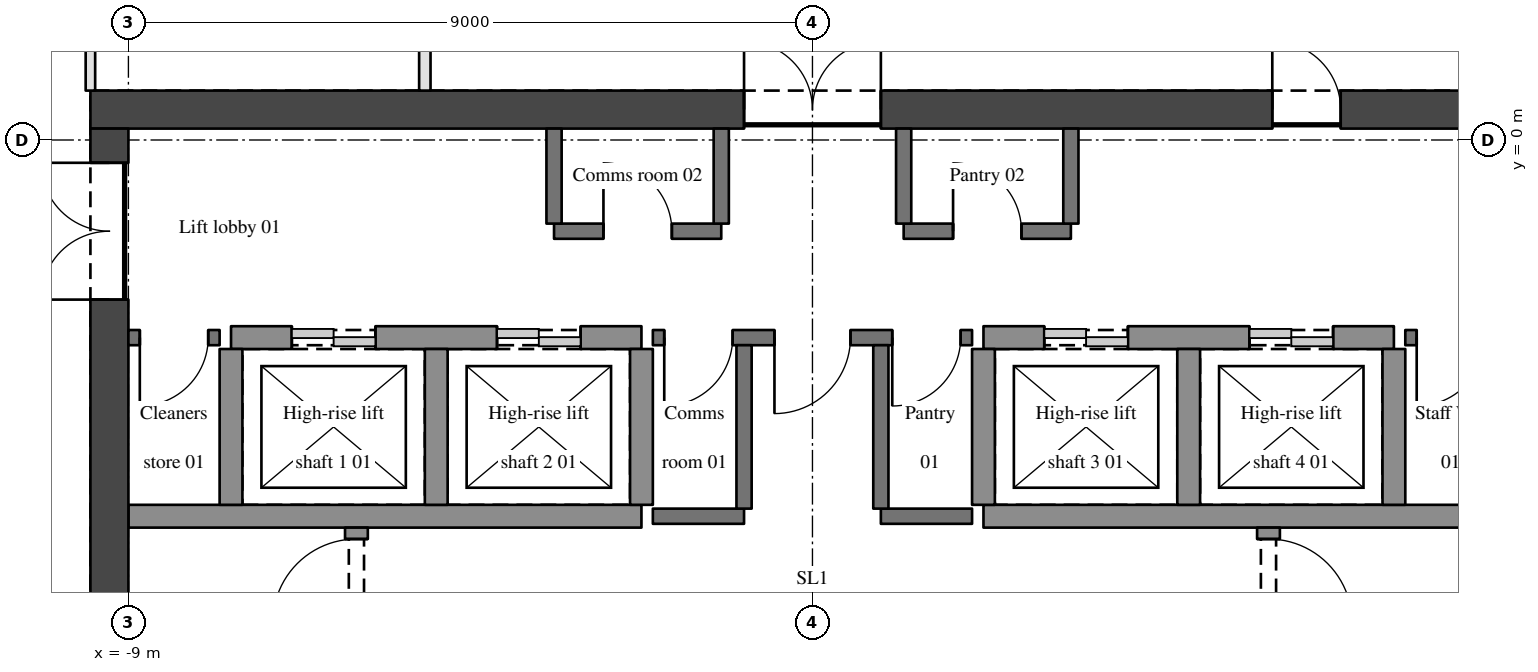
"""IFC4 building model, lengths in metres.
Left out: names, types, materials, properties, quantities, classifications, styles, units other than length and angle.
Written with IfcOpenShell. Run it as: python <this file> out.ifc"""

import sys

from ifc_helpers import new_model, si_unit, direction, frame, frame_2d, origin, place, context, subcontext, project, spatial, rectangle, extrude, element, fill, save


model = new_model("IFC4")
c1 = context("Model", 3, precision=1e-05, world=origin(), true_north=direction((0.0, 1.0)))
c2 = subcontext(c1, "Body", "Model", "MODEL_VIEW")
j1 = project(units=[si_unit("LENGTHUNIT", "METRE"), si_unit("PLANEANGLEUNIT", "RADIAN")], contexts=[c1])
p1 = place(None, origin())
s1 = spatial("IfcSite", under=j1, at=p1, CompositionType="ELEMENT")
p2 = place(p1, origin())
s2 = spatial("IfcBuilding", under=s1, at=p2, CompositionType="ELEMENT")
p3 = place(p2, frame((0.0, 0.0, 294.15)))
s3 = spatial("IfcBuildingStorey", under=s2, at=p3, CompositionType="ELEMENT", Elevation=294.15)
p4 = place(p3, frame((-9.5, 0.4, 0.0), z_axis=(0.0, 0.0, 1.0), x_axis=(1.0, 0.0, 0.0)))
e1 = element("IfcWall", 1, at=p4, inside=s3, PredefinedType="SHEAR", context=c2, shape_type="SweptSolid", body=[
    extrude(rectangle(XDim=19.0, YDim=0.5, at=frame_2d((9.5, 0.0))), origin(), (0.0, 0.0, 1.0), 3.15),
])
p5 = place(p4, frame((8.6, 0.0, 0.0)))
e2 = element("IfcOpeningElement", 2, at=p5, cuts=e1, PredefinedType="OPENING", context=c2, shape_type="SweptSolid", body=[
    extrude(rectangle(XDim=1.8, YDim=2.1, at=frame_2d((0.9, 1.05))), frame((0.0, 0.26, 0.0), z_axis=(0.0, -1.0, 0.0), x_axis=(1.0, 0.0, 0.0)), (0.0, 0.0, 1.0), 0.52),
])
p6 = place(p4, frame((15.55, 0.0, 0.0)))
e3 = element("IfcOpeningElement", 3, at=p6, cuts=e1, PredefinedType="OPENING", context=c2, shape_type="SweptSolid", body=[
    extrude(rectangle(XDim=0.9, YDim=2.1, at=frame_2d((0.45, 1.05))), frame((0.0, 0.26, 0.0), z_axis=(0.0, -1.0, 0.0), x_axis=(1.0, 0.0, 0.0)), (0.0, 0.0, 1.0), 0.52),
])
p7 = place(p3, frame((-9.25, -11.5, 0.0), z_axis=(0.0, 0.0, 1.0), x_axis=(0.0, 1.0, 0.0)))
e4 = element("IfcWall", 4, at=p7, inside=s3, PredefinedType="SHEAR", context=c2, shape_type="SweptSolid", body=[
    extrude(rectangle(XDim=11.65, YDim=0.5, at=frame_2d((5.825, 0.0))), origin(), (0.0, 0.0, 1.0), 3.15),
])
p8 = place(p7, frame((9.4, 0.0, 0.0)))
e5 = element("IfcOpeningElement", 5, at=p8, cuts=e4, PredefinedType="OPENING", context=c2, shape_type="SweptSolid", body=[
    extrude(rectangle(XDim=1.8, YDim=2.1, at=frame_2d((0.9, 1.05))), frame((0.0, 0.26, 0.0), z_axis=(0.0, -1.0, 0.0), x_axis=(1.0, 0.0, 0.0)), (0.0, 0.0, 1.0), 0.52),
])
p9 = place(p3, frame((-9.0, -4.95, 0.0), z_axis=(0.0, 0.0, 1.0), x_axis=(1.0, 0.0, 0.0)))
e6 = element("IfcWall", 6, at=p9, inside=s3, PredefinedType="SHEAR", context=c2, shape_type="SweptSolid", body=[
    extrude(rectangle(XDim=6.75, YDim=0.3, at=frame_2d((3.375, 0.0))), origin(), (0.0, 0.0, 1.0), 3.15),
])
for number, where, z_axis, x_axis in (
    (7, (-2.1, -4.95, 0.0), (0.0, 0.0, 1.0), (1.0, 0.0, 0.0)),
    (8, (0.9, -4.95, 0.0), (0.0, 0.0, 1.0), (1.0, 0.0, 0.0)),
):
    element("IfcWall", number, at=place(p3, frame(where, z_axis=z_axis, x_axis=x_axis)), inside=s3, PredefinedType="SOLIDWALL", context=c2, shape_type="SweptSolid", body=[
        extrude(rectangle(XDim=1.2, YDim=0.2, at=frame_2d((0.6, 0.0))), origin(), (0.0, 0.0, 1.0), 2.85),
    ])
p10 = place(p3, frame((2.25, -4.95, 0.0), z_axis=(0.0, 0.0, 1.0), x_axis=(1.0, 0.0, 0.0)))
e9 = element("IfcWall", 9, at=p10, inside=s3, PredefinedType="SHEAR", context=c2, shape_type="SweptSolid", body=[
    extrude(rectangle(XDim=6.75, YDim=0.3, at=frame_2d((3.375, 0.0))), origin(), (0.0, 0.0, 1.0), 3.15),
])
p11 = place(p3, frame((-7.8, -2.6, 0.0), z_axis=(0.0, 0.0, 1.0), x_axis=(-1.0, 0.0, 0.0)))
e10 = element("IfcWall", 10, at=p11, inside=s3, PredefinedType="SOLIDWALL", context=c2, shape_type="SweptSolid", body=[
    extrude(rectangle(XDim=1.2, YDim=0.2, at=frame_2d((0.6, 0.0))), origin(), (0.0, 0.0, 1.0), 2.85),
])
p12 = place(p11, frame((0.15, 0.0, 0.0)))
e11 = element("IfcOpeningElement", 11, at=p12, cuts=e10, PredefinedType="OPENING", context=c2, shape_type="SweptSolid", body=[
    extrude(rectangle(XDim=0.9, YDim=2.1, at=frame_2d((0.45, 1.05))), frame((0.0, 0.11, 0.0), z_axis=(0.0, -1.0, 0.0), x_axis=(1.0, 0.0, 0.0)), (0.0, 0.0, 1.0), 0.22),
])
p13 = place(p3, frame((-7.65, -2.6, 0.0), z_axis=(0.0, 0.0, 1.0), x_axis=(1.0, 0.0, 0.0)))
e12 = element("IfcWall", 12, at=p13, inside=s3, PredefinedType="SHEAR", context=c2, shape_type="SweptSolid", body=[
    extrude(rectangle(XDim=5.4, YDim=0.3, at=frame_2d((2.7, 0.0))), origin(), (0.0, 0.0, 1.0), 3.15),
])
p14 = place(p13, frame((0.8, 0.0, 0.0)))
e13 = element("IfcOpeningElement", 13, at=p14, cuts=e12, PredefinedType="OPENING", context=c2, shape_type="SweptSolid", body=[
    extrude(rectangle(XDim=1.1, YDim=2.1, at=frame_2d((0.55, 1.05))), frame((0.0, 0.16, 0.0), z_axis=(0.0, -1.0, 0.0), x_axis=(1.0, 0.0, 0.0)), (0.0, 0.0, 1.0), 0.32),
])
p15 = place(p13, frame((3.5, 0.0, 0.0)))
e14 = element("IfcOpeningElement", 14, at=p15, cuts=e12, PredefinedType="OPENING", context=c2, shape_type="SweptSolid", body=[
    extrude(rectangle(XDim=1.1, YDim=2.1, at=frame_2d((0.55, 1.05))), frame((0.0, 0.16, 0.0), z_axis=(0.0, -1.0, 0.0), x_axis=(1.0, 0.0, 0.0)), (0.0, 0.0, 1.0), 0.32),
])
p16 = place(p3, frame((2.1, -2.6, 0.0), z_axis=(0.0, 0.0, 1.0), x_axis=(-1.0, 0.0, 0.0)))
e15 = element("IfcWall", 15, at=p16, inside=s3, PredefinedType="SOLIDWALL", context=c2, shape_type="SweptSolid", body=[
    extrude(rectangle(XDim=4.2, YDim=0.2, at=frame_2d((2.1, 0.0))), origin(), (0.0, 0.0, 1.0), 2.85),
])
p17 = place(p16, frame((1.6, 0.0, 0.0)))
e16 = element("IfcOpeningElement", 16, at=p17, cuts=e15, PredefinedType="OPENING", context=c2, shape_type="SweptSolid", body=[
    extrude(rectangle(XDim=1.0, YDim=2.1, at=frame_2d((0.5, 1.05))), frame((0.0, 0.11, 0.0), z_axis=(0.0, -1.0, 0.0), x_axis=(1.0, 0.0, 0.0)), (0.0, 0.0, 1.0), 0.22),
])
p18 = place(p16, frame((3.15, 0.0, 0.0)))
e17 = element("IfcOpeningElement", 17, at=p18, cuts=e15, PredefinedType="OPENING", context=c2, shape_type="SweptSolid", body=[
    extrude(rectangle(XDim=0.9, YDim=2.1, at=frame_2d((0.45, 1.05))), frame((0.0, 0.11, 0.0), z_axis=(0.0, -1.0, 0.0), x_axis=(1.0, 0.0, 0.0)), (0.0, 0.0, 1.0), 0.22),
])
p19 = place(p16, frame((0.15, 0.0, 0.0)))
e18 = element("IfcOpeningElement", 18, at=p19, cuts=e15, PredefinedType="OPENING", context=c2, shape_type="SweptSolid", body=[
    extrude(rectangle(XDim=0.9, YDim=2.1, at=frame_2d((0.45, 1.05))), frame((0.0, 0.11, 0.0), z_axis=(0.0, -1.0, 0.0), x_axis=(1.0, 0.0, 0.0)), (0.0, 0.0, 1.0), 0.22),
])
p20 = place(p3, frame((2.25, -2.6, 0.0), z_axis=(0.0, 0.0, 1.0), x_axis=(1.0, 0.0, 0.0)))
e19 = element("IfcWall", 19, at=p20, inside=s3, PredefinedType="SHEAR", context=c2, shape_type="SweptSolid", body=[
    extrude(rectangle(XDim=5.4, YDim=0.3, at=frame_2d((2.7, 0.0))), origin(), (0.0, 0.0, 1.0), 3.15),
])
p21 = place(p20, frame((0.8, 0.0, 0.0)))
e20 = element("IfcOpeningElement", 20, at=p21, cuts=e19, PredefinedType="OPENING", context=c2, shape_type="SweptSolid", body=[
    extrude(rectangle(XDim=1.1, YDim=2.1, at=frame_2d((0.55, 1.05))), frame((0.0, 0.16, 0.0), z_axis=(0.0, -1.0, 0.0), x_axis=(1.0, 0.0, 0.0)), (0.0, 0.0, 1.0), 0.32),
])
p22 = place(p20, frame((3.5, 0.0, 0.0)))
e21 = element("IfcOpeningElement", 21, at=p22, cuts=e19, PredefinedType="OPENING", context=c2, shape_type="SweptSolid", body=[
    extrude(rectangle(XDim=1.1, YDim=2.1, at=frame_2d((0.55, 1.05))), frame((0.0, 0.16, 0.0), z_axis=(0.0, -1.0, 0.0), x_axis=(1.0, 0.0, 0.0)), (0.0, 0.0, 1.0), 0.32),
])
p23 = place(p3, frame((9.0, -2.6, 0.0), z_axis=(0.0, 0.0, 1.0), x_axis=(-1.0, 0.0, 0.0)))
e22 = element("IfcWall", 22, at=p23, inside=s3, PredefinedType="SOLIDWALL", context=c2, shape_type="SweptSolid", body=[
    extrude(rectangle(XDim=1.2, YDim=0.2, at=frame_2d((0.6, 0.0))), origin(), (0.0, 0.0, 1.0), 2.85),
])
p24 = place(p23, frame((0.15, 0.0, 0.0)))
e23 = element("IfcOpeningElement", 23, at=p24, cuts=e22, PredefinedType="OPENING", context=c2, shape_type="SweptSolid", body=[
    extrude(rectangle(XDim=0.9, YDim=2.1, at=frame_2d((0.45, 1.05))), frame((0.0, 0.11, 0.0), z_axis=(0.0, -1.0, 0.0), x_axis=(1.0, 0.0, 0.0)), (0.0, 0.0, 1.0), 0.22),
])
p25 = place(p3, frame((-3.4, -1.2, 0.0), z_axis=(0.0, 0.0, 1.0), x_axis=(1.0, 0.0, 0.0)))
e24 = element("IfcWall", 24, at=p25, inside=s3, PredefinedType="SOLIDWALL", context=c2, shape_type="SweptSolid", body=[
    extrude(rectangle(XDim=2.2, YDim=0.2, at=frame_2d((1.1, 0.0))), origin(), (0.0, 0.0, 1.0), 2.85),
])
p26 = place(p25, frame((0.65, 0.0, 0.0)))
e25 = element("IfcOpeningElement", 25, at=p26, cuts=e24, PredefinedType="OPENING", context=c2, shape_type="SweptSolid", body=[
    extrude(rectangle(XDim=0.9, YDim=2.1, at=frame_2d((0.45, 1.05))), frame((0.0, 0.11, 0.0), z_axis=(0.0, -1.0, 0.0), x_axis=(1.0, 0.0, 0.0)), (0.0, 0.0, 1.0), 0.22),
])
p27 = place(p3, frame((1.2, -1.2, 0.0), z_axis=(0.0, 0.0, 1.0), x_axis=(1.0, 0.0, 0.0)))
e26 = element("IfcWall", 26, at=p27, inside=s3, PredefinedType="SOLIDWALL", context=c2, shape_type="SweptSolid", body=[
    extrude(rectangle(XDim=2.2, YDim=0.2, at=frame_2d((1.1, 0.0))), origin(), (0.0, 0.0, 1.0), 2.85),
])
p28 = place(p27, frame((0.65, 0.0, 0.0)))
e27 = element("IfcOpeningElement", 27, at=p28, cuts=e26, PredefinedType="OPENING", context=c2, shape_type="SweptSolid", body=[
    extrude(rectangle(XDim=0.9, YDim=2.1, at=frame_2d((0.45, 1.05))), frame((0.0, 0.11, 0.0), z_axis=(0.0, -1.0, 0.0), x_axis=(1.0, 0.0, 0.0)), (0.0, 0.0, 1.0), 0.22),
])
p29 = place(p3, frame((-9.5, 0.65, 0.0), z_axis=(0.0, 0.0, 1.0), x_axis=(0.0, 1.0, 0.0)))
e28 = element("IfcWall", 28, at=p29, inside=s3, PredefinedType="PARTITIONING", context=c2, shape_type="SweptSolid", body=[
    extrude(rectangle(XDim=2.525, YDim=0.125, at=frame_2d((1.263, 0.0))), origin(), (0.0, 0.0, 1.0), 2.21),
])
p30 = place(p3, frame((-7.65, -4.8, 0.0), z_axis=(0.0, 0.0, 1.0), x_axis=(0.0, 1.0, 0.0)))
e29 = element("IfcWall", 29, at=p30, inside=s3, PredefinedType="SHEAR", context=c2, shape_type="SweptSolid", body=[
    extrude(rectangle(XDim=2.05, YDim=0.3, at=frame_2d((1.025, 0.0))), origin(), (0.0, 0.0, 1.0), 3.15),
])
p31 = place(p3, frame((-6.0, -11.5, 0.0), z_axis=(0.0, 0.0, 1.0), x_axis=(0.0, 1.0, 0.0)))
e30 = element("IfcWall", 30, at=p31, inside=s3, PredefinedType="SHEAR", context=c2, shape_type="SweptSolid", body=[
    extrude(rectangle(XDim=6.4, YDim=0.3, at=frame_2d((3.2, 0.0))), origin(), (0.0, 0.0, 1.0), 3.15),
])
p32 = place(p31, frame((5.15, 0.0, 0.0)))
e31 = element("IfcOpeningElement", 31, at=p32, cuts=e30, PredefinedType="OPENING", context=c2, shape_type="SweptSolid", body=[
    extrude(rectangle(XDim=1.1, YDim=2.1, at=frame_2d((0.55, 1.05))), frame((0.0, 0.16, 0.0), z_axis=(0.0, -1.0, 0.0), x_axis=(1.0, 0.0, 0.0)), (0.0, 0.0, 1.0), 0.32),
])
p33 = place(p3, frame((-5.1, 0.65, 0.0), z_axis=(0.0, 0.0, 1.0), x_axis=(0.0, 1.0, 0.0)))
e32 = element("IfcWall", 32, at=p33, inside=s3, PredefinedType="PARTITIONING", context=c2, shape_type="SweptSolid", body=[
    extrude(rectangle(XDim=2.525, YDim=0.15, at=frame_2d((1.263, 0.0))), origin(), (0.0, 0.0, 1.0), 2.21),
])
p34 = place(p33, frame((0.85, 0.0, 0.0)))
e33 = element("IfcOpeningElement", 33, at=p34, cuts=e32, PredefinedType="OPENING", context=c2, shape_type="SweptSolid", body=[
    extrude(rectangle(XDim=0.9, YDim=2.1, at=frame_2d((0.45, 1.05))), frame((0.0, 0.085, 0.0), z_axis=(0.0, -1.0, 0.0), x_axis=(1.0, 0.0, 0.0)), (0.0, 0.0, 1.0), 0.17),
])
p35 = place(p3, frame((-4.95, -4.8, 0.0), z_axis=(0.0, 0.0, 1.0), x_axis=(0.0, 1.0, 0.0)))
e34 = element("IfcWall", 34, at=p35, inside=s3, PredefinedType="SHEAR", context=c2, shape_type="SweptSolid", body=[
    extrude(rectangle(XDim=2.05, YDim=0.3, at=frame_2d((1.025, 0.0))), origin(), (0.0, 0.0, 1.0), 3.15),
])
p36 = place(p3, frame((-3.4, -1.1, 0.0), z_axis=(0.0, 0.0, 1.0), x_axis=(0.0, 1.0, 0.0)))
e35 = element("IfcWall", 35, at=p36, inside=s3, PredefinedType="SOLIDWALL", context=c2, shape_type="SweptSolid", body=[
    extrude(rectangle(XDim=1.25, YDim=0.2, at=frame_2d((0.625, 0.0))), origin(), (0.0, 0.0, 1.0), 2.85),
])
p37 = place(p3, frame((-2.25, -4.8, 0.0), z_axis=(0.0, 0.0, 1.0), x_axis=(0.0, 1.0, 0.0)))
e36 = element("IfcWall", 36, at=p37, inside=s3, PredefinedType="SHEAR", context=c2, shape_type="SweptSolid", body=[
    extrude(rectangle(XDim=2.05, YDim=0.3, at=frame_2d((1.025, 0.0))), origin(), (0.0, 0.0, 1.0), 3.15),
])
p38 = place(p3, frame((-1.2, -1.1, 0.0), z_axis=(0.0, 0.0, 1.0), x_axis=(0.0, 1.0, 0.0)))
e37 = element("IfcWall", 37, at=p38, inside=s3, PredefinedType="SOLIDWALL", context=c2, shape_type="SweptSolid", body=[
    extrude(rectangle(XDim=1.25, YDim=0.2, at=frame_2d((0.625, 0.0))), origin(), (0.0, 0.0, 1.0), 2.85),
])
for number, where, z_axis, x_axis in (
    (38, (-0.9, -4.85, 0.0), (0.0, 0.0, 1.0), (0.0, 1.0, 0.0)),
    (39, (0.9, -4.85, 0.0), (0.0, 0.0, 1.0), (0.0, 1.0, 0.0)),
):
    element("IfcWall", number, at=place(p3, frame(where, z_axis=z_axis, x_axis=x_axis)), inside=s3, PredefinedType="SOLIDWALL", context=c2, shape_type="SweptSolid", body=[
        extrude(rectangle(XDim=2.15, YDim=0.2, at=frame_2d((1.075, 0.0))), origin(), (0.0, 0.0, 1.0), 2.85),
    ])
p39 = place(p3, frame((1.2, -1.1, 0.0), z_axis=(0.0, 0.0, 1.0), x_axis=(0.0, 1.0, 0.0)))
e40 = element("IfcWall", 40, at=p39, inside=s3, PredefinedType="SOLIDWALL", context=c2, shape_type="SweptSolid", body=[
    extrude(rectangle(XDim=1.25, YDim=0.2, at=frame_2d((0.625, 0.0))), origin(), (0.0, 0.0, 1.0), 2.85),
])
p40 = place(p3, frame((2.25, -4.8, 0.0), z_axis=(0.0, 0.0, 1.0), x_axis=(0.0, 1.0, 0.0)))
e41 = element("IfcWall", 41, at=p40, inside=s3, PredefinedType="SHEAR", context=c2, shape_type="SweptSolid", body=[
    extrude(rectangle(XDim=2.05, YDim=0.3, at=frame_2d((1.025, 0.0))), origin(), (0.0, 0.0, 1.0), 3.15),
])
p41 = place(p3, frame((3.4, -1.1, 0.0), z_axis=(0.0, 0.0, 1.0), x_axis=(0.0, 1.0, 0.0)))
e42 = element("IfcWall", 42, at=p41, inside=s3, PredefinedType="SOLIDWALL", context=c2, shape_type="SweptSolid", body=[
    extrude(rectangle(XDim=1.25, YDim=0.2, at=frame_2d((0.625, 0.0))), origin(), (0.0, 0.0, 1.0), 2.85),
])
p42 = place(p3, frame((4.95, -4.8, 0.0), z_axis=(0.0, 0.0, 1.0), x_axis=(0.0, 1.0, 0.0)))
e43 = element("IfcWall", 43, at=p42, inside=s3, PredefinedType="SHEAR", context=c2, shape_type="SweptSolid", body=[
    extrude(rectangle(XDim=2.05, YDim=0.3, at=frame_2d((1.025, 0.0))), origin(), (0.0, 0.0, 1.0), 3.15),
])
p43 = place(p3, frame((6.0, -5.1, 0.0), z_axis=(0.0, 0.0, 1.0), x_axis=(0.0, -1.0, 0.0)))
e44 = element("IfcWall", 44, at=p43, inside=s3, PredefinedType="SHEAR", context=c2, shape_type="SweptSolid", body=[
    extrude(rectangle(XDim=6.4, YDim=0.3, at=frame_2d((3.2, 0.0))), origin(), (0.0, 0.0, 1.0), 3.15),
])
p44 = place(p43, frame((0.15, 0.0, 0.0)))
e45 = element("IfcOpeningElement", 45, at=p44, cuts=e44, PredefinedType="OPENING", context=c2, shape_type="SweptSolid", body=[
    extrude(rectangle(XDim=1.1, YDim=2.1, at=frame_2d((0.55, 1.05))), frame((0.0, 0.16, 0.0), z_axis=(0.0, -1.0, 0.0), x_axis=(1.0, 0.0, 0.0)), (0.0, 0.0, 1.0), 0.32),
])
p45 = place(p3, frame((7.65, -4.8, 0.0), z_axis=(0.0, 0.0, 1.0), x_axis=(0.0, 1.0, 0.0)))
e46 = element("IfcWall", 46, at=p45, inside=s3, PredefinedType="SHEAR", context=c2, shape_type="SweptSolid", body=[
    extrude(rectangle(XDim=2.05, YDim=0.3, at=frame_2d((1.025, 0.0))), origin(), (0.0, 0.0, 1.0), 3.15),
])
p46 = place(p5, origin())
e47 = element("IfcDoor", 47, at=p46, inside=s3, OperationType="DOUBLE_DOOR_SINGLE_SWING", PredefinedType="DOOR", context=c2, shape_type="SweptSolid", body=[
    extrude(rectangle(XDim=1.8, YDim=2.1, at=frame_2d((0.9, 1.05))), frame((0.0, 0.025, 0.0), z_axis=(0.0, -1.0, 0.0), x_axis=(1.0, 0.0, 0.0)), (0.0, 0.0, 1.0), 0.05),
])
fill(e2, e47)
p47 = place(p8, origin())
e48 = element("IfcDoor", 48, at=p47, inside=s3, OperationType="DOUBLE_DOOR_SINGLE_SWING", PredefinedType="DOOR", context=c2, shape_type="SweptSolid", body=[
    extrude(rectangle(XDim=1.8, YDim=2.1, at=frame_2d((0.9, 1.05))), frame((0.0, 0.025, 0.0), z_axis=(0.0, -1.0, 0.0), x_axis=(1.0, 0.0, 0.0)), (0.0, 0.0, 1.0), 0.05),
])
fill(e5, e48)
p48 = place(p17, origin())
e49 = element("IfcDoor", 49, at=p48, inside=s3, OperationType="SINGLE_SWING_RIGHT", PredefinedType="DOOR", context=c2, shape_type="SweptSolid", body=[
    extrude(rectangle(XDim=1.0, YDim=2.1, at=frame_2d((0.5, 1.05))), frame((0.0, 0.025, 0.0), z_axis=(0.0, -1.0, 0.0), x_axis=(1.0, 0.0, 0.0)), (0.0, 0.0, 1.0), 0.05),
])
fill(e16, e49)
p49 = place(p32, origin())
e50 = element("IfcDoor", 50, at=p49, inside=s3, OperationType="SINGLE_SWING_LEFT", PredefinedType="DOOR", context=c2, shape_type="SweptSolid", body=[
    extrude(rectangle(XDim=1.1, YDim=2.1, at=frame_2d((0.55, 1.05))), frame((0.0, 0.025, 0.0), z_axis=(0.0, -1.0, 0.0), x_axis=(1.0, 0.0, 0.0)), (0.0, 0.0, 1.0), 0.05),
])
fill(e31, e50)
p50 = place(p44, origin())
e51 = element("IfcDoor", 51, at=p50, inside=s3, OperationType="SINGLE_SWING_RIGHT", PredefinedType="DOOR", context=c2, shape_type="SweptSolid", body=[
    extrude(rectangle(XDim=1.1, YDim=2.1, at=frame_2d((0.55, 1.05))), frame((0.0, 0.025, 0.0), z_axis=(0.0, -1.0, 0.0), x_axis=(1.0, 0.0, 0.0)), (0.0, 0.0, 1.0), 0.05),
])
fill(e45, e51)
p51 = place(p18, origin())
e52 = element("IfcDoor", 52, at=p51, inside=s3, OperationType="SINGLE_SWING_RIGHT", PredefinedType="DOOR", context=c2, shape_type="SweptSolid", body=[
    extrude(rectangle(XDim=0.9, YDim=2.1, at=frame_2d((0.45, 1.05))), frame((0.0, 0.025, 0.0), z_axis=(0.0, -1.0, 0.0), x_axis=(1.0, 0.0, 0.0)), (0.0, 0.0, 1.0), 0.05),
])
fill(e17, e52)
p52 = place(p19, origin())
e53 = element("IfcDoor", 53, at=p52, inside=s3, OperationType="SINGLE_SWING_RIGHT", PredefinedType="DOOR", context=c2, shape_type="SweptSolid", body=[
    extrude(rectangle(XDim=0.9, YDim=2.1, at=frame_2d((0.45, 1.05))), frame((0.0, 0.025, 0.0), z_axis=(0.0, -1.0, 0.0), x_axis=(1.0, 0.0, 0.0)), (0.0, 0.0, 1.0), 0.05),
])
fill(e18, e53)
p53 = place(p24, origin())
e54 = element("IfcDoor", 54, at=p53, inside=s3, OperationType="SINGLE_SWING_RIGHT", PredefinedType="DOOR", context=c2, shape_type="SweptSolid", body=[
    extrude(rectangle(XDim=0.9, YDim=2.1, at=frame_2d((0.45, 1.05))), frame((0.0, 0.025, 0.0), z_axis=(0.0, -1.0, 0.0), x_axis=(1.0, 0.0, 0.0)), (0.0, 0.0, 1.0), 0.05),
])
fill(e23, e54)
p54 = place(p12, origin())
e55 = element("IfcDoor", 55, at=p54, inside=s3, OperationType="SINGLE_SWING_RIGHT", PredefinedType="DOOR", context=c2, shape_type="SweptSolid", body=[
    extrude(rectangle(XDim=0.9, YDim=2.1, at=frame_2d((0.45, 1.05))), frame((0.0, 0.025, 0.0), z_axis=(0.0, -1.0, 0.0), x_axis=(1.0, 0.0, 0.0)), (0.0, 0.0, 1.0), 0.05),
])
fill(e11, e55)
p55 = place(p6, origin())
e56 = element("IfcDoor", 56, at=p55, inside=s3, OperationType="SINGLE_SWING_LEFT", PredefinedType="DOOR", context=c2, shape_type="SweptSolid", body=[
    extrude(rectangle(XDim=0.9, YDim=2.1, at=frame_2d((0.45, 1.05))), frame((0.0, 0.025, 0.0), z_axis=(0.0, -1.0, 0.0), x_axis=(1.0, 0.0, 0.0)), (0.0, 0.0, 1.0), 0.05),
])
fill(e3, e56)
p56 = place(p26, origin())
e57 = element("IfcDoor", 57, at=p56, inside=s3, OperationType="SINGLE_SWING_LEFT", PredefinedType="DOOR", context=c2, shape_type="SweptSolid", body=[
    extrude(rectangle(XDim=0.9, YDim=2.1, at=frame_2d((0.45, 1.05))), frame((0.0, 0.025, 0.0), z_axis=(0.0, -1.0, 0.0), x_axis=(1.0, 0.0, 0.0)), (0.0, 0.0, 1.0), 0.05),
])
fill(e25, e57)
p57 = place(p28, origin())
e58 = element("IfcDoor", 58, at=p57, inside=s3, OperationType="SINGLE_SWING_LEFT", PredefinedType="DOOR", context=c2, shape_type="SweptSolid", body=[
    extrude(rectangle(XDim=0.9, YDim=2.1, at=frame_2d((0.45, 1.05))), frame((0.0, 0.025, 0.0), z_axis=(0.0, -1.0, 0.0), x_axis=(1.0, 0.0, 0.0)), (0.0, 0.0, 1.0), 0.05),
])
fill(e27, e58)
p58 = place(p14, origin())
e59 = element("IfcDoor", 59, at=p58, inside=s3, OperationType="DOUBLE_DOOR_SLIDING", PredefinedType="DOOR", context=c2, shape_type="SweptSolid", body=[
    extrude(rectangle(XDim=1.1, YDim=2.1, at=frame_2d((0.55, 1.05))), frame((0.0, 0.025, 0.0), z_axis=(0.0, -1.0, 0.0), x_axis=(1.0, 0.0, 0.0)), (0.0, 0.0, 1.0), 0.05),
])
fill(e13, e59)
p59 = place(p15, origin())
e60 = element("IfcDoor", 60, at=p59, inside=s3, OperationType="DOUBLE_DOOR_SLIDING", PredefinedType="DOOR", context=c2, shape_type="SweptSolid", body=[
    extrude(rectangle(XDim=1.1, YDim=2.1, at=frame_2d((0.55, 1.05))), frame((0.0, 0.025, 0.0), z_axis=(0.0, -1.0, 0.0), x_axis=(1.0, 0.0, 0.0)), (0.0, 0.0, 1.0), 0.05),
])
fill(e14, e60)
p60 = place(p21, origin())
e61 = element("IfcDoor", 61, at=p60, inside=s3, OperationType="DOUBLE_DOOR_SLIDING", PredefinedType="DOOR", context=c2, shape_type="SweptSolid", body=[
    extrude(rectangle(XDim=1.1, YDim=2.1, at=frame_2d((0.55, 1.05))), frame((0.0, 0.025, 0.0), z_axis=(0.0, -1.0, 0.0), x_axis=(1.0, 0.0, 0.0)), (0.0, 0.0, 1.0), 0.05),
])
fill(e20, e61)
p61 = place(p22, origin())
e62 = element("IfcDoor", 62, at=p61, inside=s3, OperationType="DOUBLE_DOOR_SLIDING", PredefinedType="DOOR", context=c2, shape_type="SweptSolid", body=[
    extrude(rectangle(XDim=1.1, YDim=2.1, at=frame_2d((0.55, 1.05))), frame((0.0, 0.025, 0.0), z_axis=(0.0, -1.0, 0.0), x_axis=(1.0, 0.0, 0.0)), (0.0, 0.0, 1.0), 0.05),
])
fill(e21, e62)
save(model, sys.argv[1])
